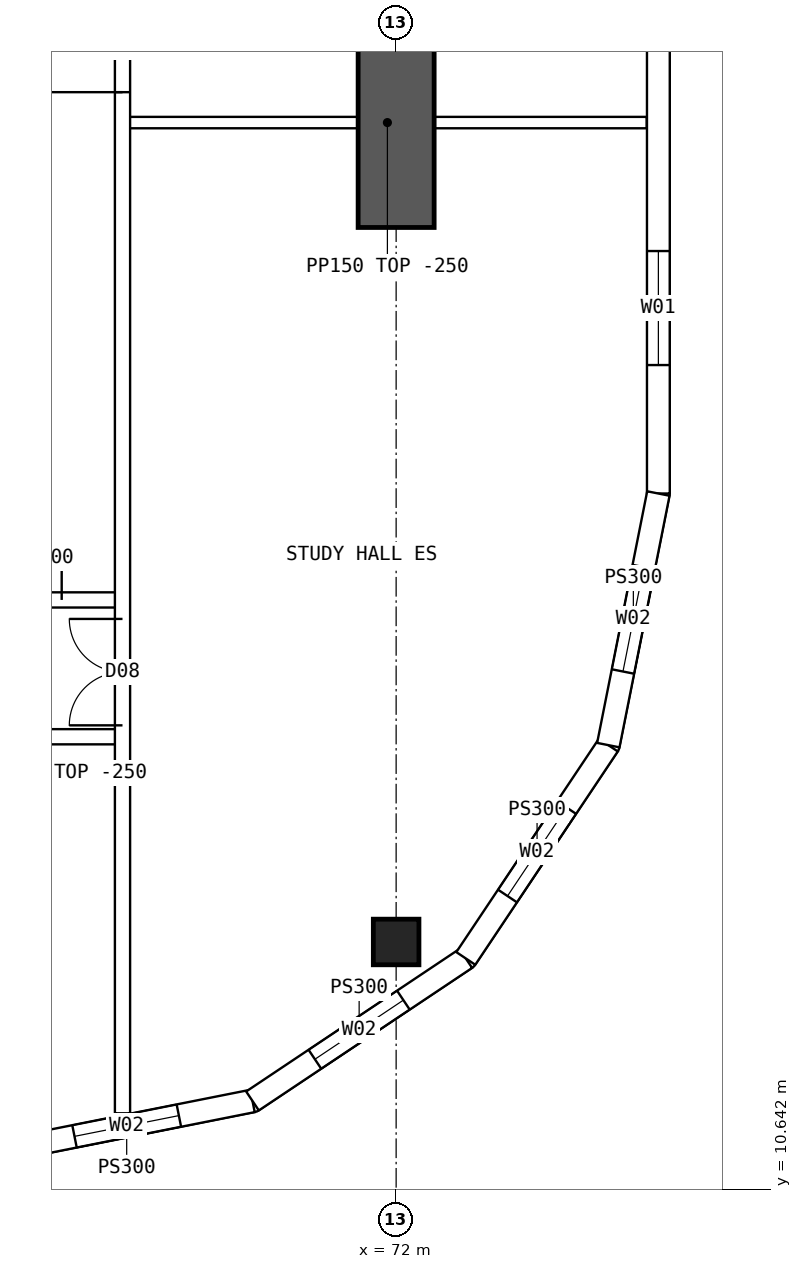
"""IFC4 building model, lengths in metres.
Left out: names, types, materials, properties, quantities, classifications, styles, units other than length and angle.
Written with IfcOpenShell. Run it as: python <this file> out.ifc"""

import sys

from ifc_helpers import new_model, si_unit, direction, frame, frame_2d, origin, origin_2d, place, context, subcontext, project, spatial, polyline, rectangle, hollow_rectangle, outline, extrude, element, fill, save


model = new_model("IFC4")
c1 = context("Model", 3, precision=1e-05, world=origin(), true_north=direction((0.0, 1.0)))
c2 = subcontext(c1, "Body", "Model", "MODEL_VIEW")
j1 = project(units=[si_unit("LENGTHUNIT", "METRE"), si_unit("PLANEANGLEUNIT", "RADIAN")], contexts=[c1])
p1 = place(None, origin())
s1 = spatial("IfcSite", under=j1, at=p1, CompositionType="ELEMENT")
p2 = place(p1, origin())
s2 = spatial("IfcBuilding", under=s1, at=p2, CompositionType="ELEMENT")
p3 = place(p2, frame((0.0, 0.0, 231.55)))
s3 = spatial("IfcBuildingStorey", under=s2, at=p3, CompositionType="ELEMENT", Elevation=231.55)
p4 = place(p3, frame((72.0, 13.9, 0.0), z_axis=(0.0, 0.0, 1.0), x_axis=(1.0, 0.0, 0.0)))
e1 = element("IfcColumn", 1, at=p4, inside=s3, PredefinedType="COLUMN", context=c2, shape_type="SweptSolid", body=[
    extrude(hollow_rectangle(XDim=0.6, YDim=0.6, WallThickness=0.06, at=origin_2d()), origin(), (0.0, 0.0, 1.0), 3.75),
])
p5 = place(p3, frame((72.0, 23.3, 0.0), z_axis=(0.0, 0.0, 1.0), x_axis=(0.0, 1.0, 0.0)))
e2 = element("IfcWall", 2, at=p5, inside=s3, PredefinedType="SHEAR", context=c2, shape_type="SweptSolid", body=[
    extrude(rectangle(XDim=5.0, YDim=1.0, at=frame_2d((2.5, 0.0))), origin(), (0.0, 0.0, 1.0), 3.75),
])
p6 = place(p3, frame((75.45, 19.8, 0.0), z_axis=(0.0, 0.0, 1.0), x_axis=(0.0, 1.0, 0.0)))
e3 = element("IfcWall", 3, at=p6, inside=s3, PredefinedType="SOLIDWALL", context=c2, shape_type="SweptSolid", body=[
    extrude(outline(polyline([(-0.015, -0.15), (24.415, -0.15), (24.385, 0.15), (0.015, 0.15), (-0.015, -0.15)])), origin(), (0.0, 0.0, 1.0), 3.5),
])
p7 = place(p6, frame((1.69, 0.0, 0.9)))
e4 = element("IfcOpeningElement", 4, at=p7, cuts=e3, PredefinedType="OPENING", context=c2, shape_type="SweptSolid", body=[
    extrude(rectangle(XDim=1.5, YDim=2.0, at=frame_2d((0.75, 1.0))), frame((0.0, 0.16, 0.0), z_axis=(0.0, -1.0, 0.0), x_axis=(1.0, 0.0, 0.0)), (0.0, 0.0, 1.0), 0.32),
])
p8 = place(p6, frame((6.57, 0.0, 0.9)))
e5 = element("IfcOpeningElement", 5, at=p8, cuts=e3, PredefinedType="OPENING", context=c2, shape_type="SweptSolid", body=[
    extrude(rectangle(XDim=1.5, YDim=2.0, at=frame_2d((0.75, 1.0))), frame((0.0, 0.16, 0.0), z_axis=(0.0, -1.0, 0.0), x_axis=(1.0, 0.0, 0.0)), (0.0, 0.0, 1.0), 0.32),
])
p9 = place(p6, frame((11.45, 0.0, 0.9)))
e6 = element("IfcOpeningElement", 6, at=p9, cuts=e3, PredefinedType="OPENING", context=c2, shape_type="SweptSolid", body=[
    extrude(rectangle(XDim=1.5, YDim=2.0, at=frame_2d((0.75, 1.0))), frame((0.0, 0.16, 0.0), z_axis=(0.0, -1.0, 0.0), x_axis=(1.0, 0.0, 0.0)), (0.0, 0.0, 1.0), 0.32),
])
p10 = place(p6, frame((16.33, 0.0, 0.9)))
e7 = element("IfcOpeningElement", 7, at=p10, cuts=e3, PredefinedType="OPENING", context=c2, shape_type="SweptSolid", body=[
    extrude(rectangle(XDim=1.5, YDim=2.0, at=frame_2d((0.75, 1.0))), frame((0.0, 0.16, 0.0), z_axis=(0.0, -1.0, 0.0), x_axis=(1.0, 0.0, 0.0)), (0.0, 0.0, 1.0), 0.32),
])
p11 = place(p6, frame((21.21, 0.0, 0.9)))
e8 = element("IfcOpeningElement", 8, at=p11, cuts=e3, PredefinedType="OPENING", context=c2, shape_type="SweptSolid", body=[
    extrude(rectangle(XDim=1.5, YDim=2.0, at=frame_2d((0.75, 1.0))), frame((0.0, 0.16, 0.0), z_axis=(0.0, -1.0, 0.0), x_axis=(1.0, 0.0, 0.0)), (0.0, 0.0, 1.0), 0.32),
])
p12 = place(p3, frame((66.8, 11.15, 0.0), z_axis=(0.0, 0.0, 1.0), x_axis=(0.98078325777, 0.195100490205, 0.0)))
e9 = element("IfcWall", 9, at=p12, inside=s3, PredefinedType="SOLIDWALL", context=c2, shape_type="SweptSolid", body=[
    extrude(outline(polyline([(-0.03, -0.15), (3.405, -0.15), (3.345, 0.15), (0.03, 0.15), (-0.03, -0.15)])), origin(), (0.0, 0.0, 1.0), 3.5),
])
p13 = place(p12, frame((0.988, 0.0, 0.9)))
e10 = element("IfcOpeningElement", 10, at=p13, cuts=e9, PredefinedType="OPENING", context=c2, shape_type="SweptSolid", body=[
    extrude(rectangle(XDim=1.4, YDim=1.8, at=frame_2d((0.7, 0.9))), frame((0.0, 0.16, 0.0), z_axis=(0.0, -1.0, 0.0), x_axis=(1.0, 0.0, 0.0)), (0.0, 0.0, 1.0), 0.32),
])
p14 = place(p3, frame((70.11, 11.808, 0.0), z_axis=(0.0, 0.0, 1.0), x_axis=(0.831460037396, 0.555584562613, 0.0)))
e11 = element("IfcWall", 11, at=p14, inside=s3, PredefinedType="SOLIDWALL", context=c2, shape_type="SweptSolid", body=[
    extrude(outline(polyline([(-0.03, -0.15), (3.405, -0.15), (3.345, 0.15), (0.03, 0.15), (-0.03, -0.15)])), origin(), (0.0, 0.0, 1.0), 3.5),
])
p15 = place(p14, frame((0.988, 0.0, 0.9)))
e12 = element("IfcOpeningElement", 12, at=p15, cuts=e11, PredefinedType="OPENING", context=c2, shape_type="SweptSolid", body=[
    extrude(rectangle(XDim=1.4, YDim=1.8, at=frame_2d((0.7, 0.9))), frame((0.0, 0.16, 0.0), z_axis=(0.0, -1.0, 0.0), x_axis=(1.0, 0.0, 0.0)), (0.0, 0.0, 1.0), 0.32),
])
p16 = place(p3, frame((72.917, 13.684, 0.0), z_axis=(0.0, 0.0, 1.0), x_axis=(0.555567969291, 0.831471124873, 0.0)))
e13 = element("IfcWall", 13, at=p16, inside=s3, PredefinedType="SOLIDWALL", context=c2, shape_type="SweptSolid", body=[
    extrude(outline(polyline([(-0.03, -0.15), (3.405, -0.15), (3.345, 0.15), (0.03, 0.15), (-0.03, -0.15)])), origin(), (0.0, 0.0, 1.0), 3.5),
])
p17 = place(p16, frame((0.988, 0.0, 0.9)))
e14 = element("IfcOpeningElement", 14, at=p17, cuts=e13, PredefinedType="OPENING", context=c2, shape_type="SweptSolid", body=[
    extrude(rectangle(XDim=1.4, YDim=1.8, at=frame_2d((0.7, 0.9))), frame((0.0, 0.16, 0.0), z_axis=(0.0, -1.0, 0.0), x_axis=(1.0, 0.0, 0.0)), (0.0, 0.0, 1.0), 0.32),
])
p18 = place(p3, frame((74.792, 16.49, 0.0), z_axis=(0.0, 0.0, 1.0), x_axis=(0.19508664885, 0.980786011034, 0.0)))
e15 = element("IfcWall", 15, at=p18, inside=s3, PredefinedType="SOLIDWALL", context=c2, shape_type="SweptSolid", body=[
    extrude(outline(polyline([(-0.03, -0.15), (3.39, -0.15), (3.36, 0.15), (0.03, 0.15), (-0.03, -0.15)])), origin(), (0.0, 0.0, 1.0), 3.5),
])
p19 = place(p18, frame((0.988, 0.0, 0.9)))
e16 = element("IfcOpeningElement", 16, at=p19, cuts=e15, PredefinedType="OPENING", context=c2, shape_type="SweptSolid", body=[
    extrude(rectangle(XDim=1.4, YDim=1.8, at=frame_2d((0.7, 0.9))), frame((0.0, 0.16, 0.0), z_axis=(0.0, -1.0, 0.0), x_axis=(1.0, 0.0, 0.0)), (0.0, 0.0, 1.0), 0.32),
])
p20 = place(p3, frame((66.35, 16.6, 0.0), z_axis=(0.0, 0.0, 1.0), x_axis=(1.0, 0.0, 0.0)))
e17 = element("IfcWall", 17, at=p20, inside=s3, PredefinedType="SOLIDWALL", context=c2, shape_type="SweptSolid", body=[
    extrude(rectangle(XDim=2.05, YDim=0.2, at=frame_2d((1.025, 0.0))), origin(), (0.0, 0.0, 1.0), 3.5),
])
p21 = place(p20, frame((0.2, 0.0, 0.0)))
e18 = element("IfcOpeningElement", 18, at=p21, cuts=e17, PredefinedType="OPENING", context=c2, shape_type="SweptSolid", body=[
    extrude(rectangle(XDim=0.9, YDim=2.1, at=frame_2d((0.45, 1.05))), frame((0.0, 0.11, 0.0), z_axis=(0.0, -1.0, 0.0), x_axis=(1.0, 0.0, 0.0)), (0.0, 0.0, 1.0), 0.22),
])
p22 = place(p3, frame((66.35, 18.4, 0.0), z_axis=(0.0, 0.0, 1.0), x_axis=(1.0, 0.0, 0.0)))
e19 = element("IfcWall", 19, at=p22, inside=s3, PredefinedType="SOLIDWALL", context=c2, shape_type="SweptSolid", body=[
    extrude(rectangle(XDim=2.05, YDim=0.2, at=frame_2d((1.025, 0.0))), origin(), (0.0, 0.0, 1.0), 3.5),
])
p23 = place(p22, frame((0.05, 0.0, 0.0)))
e20 = element("IfcOpeningElement", 20, at=p23, cuts=e19, PredefinedType="OPENING", context=c2, shape_type="SweptSolid", body=[
    extrude(rectangle(XDim=1.2, YDim=2.1, at=frame_2d((0.6, 1.05))), frame((0.0, 0.11, 0.0), z_axis=(0.0, -1.0, 0.0), x_axis=(1.0, 0.0, 0.0)), (0.0, 0.0, 1.0), 0.22),
])
p24 = place(p3, frame((68.4, 11.646, 0.0), z_axis=(0.0, 0.0, 1.0), x_axis=(0.0, 1.0, 0.0)))
e21 = element("IfcWall", 21, at=p24, inside=s3, PredefinedType="SOLIDWALL", context=c2, shape_type="SweptSolid", body=[
    extrude(rectangle(XDim=40.708, YDim=0.2, at=frame_2d((20.354, 0.0))), origin(), (0.0, 0.0, 1.0), 3.5),
])
p25 = place(p24, frame((13.434, 0.0, 0.0)))
e22 = element("IfcOpeningElement", 22, at=p25, cuts=e21, PredefinedType="OPENING", context=c2, shape_type="SweptSolid", body=[
    extrude(rectangle(XDim=1.2, YDim=2.1, at=frame_2d((0.6, 1.05))), frame((0.0, 0.11, 0.0), z_axis=(0.0, -1.0, 0.0), x_axis=(1.0, 0.0, 0.0)), (0.0, 0.0, 1.0), 0.22),
])
p26 = place(p24, frame((21.194, 0.0, 0.0)))
e23 = element("IfcOpeningElement", 23, at=p26, cuts=e21, PredefinedType="OPENING", context=c2, shape_type="SweptSolid", body=[
    extrude(rectangle(XDim=1.2, YDim=2.1, at=frame_2d((0.6, 1.05))), frame((0.0, 0.11, 0.0), z_axis=(0.0, -1.0, 0.0), x_axis=(1.0, 0.0, 0.0)), (0.0, 0.0, 1.0), 0.22),
])
p27 = place(p24, frame((5.104, 0.0, 0.0)))
e24 = element("IfcOpeningElement", 24, at=p27, cuts=e21, PredefinedType="OPENING", context=c2, shape_type="SweptSolid", body=[
    extrude(rectangle(XDim=1.4, YDim=2.1, at=frame_2d((0.7, 1.05))), frame((0.0, 0.11, 0.0), z_axis=(0.0, -1.0, 0.0), x_axis=(1.0, 0.0, 0.0)), (0.0, 0.0, 1.0), 0.22),
])
p28 = place(p24, frame((34.104, 0.0, 0.0)))
e25 = element("IfcOpeningElement", 25, at=p28, cuts=e21, PredefinedType="OPENING", context=c2, shape_type="SweptSolid", body=[
    extrude(rectangle(XDim=1.4, YDim=2.1, at=frame_2d((0.7, 1.05))), frame((0.0, 0.11, 0.0), z_axis=(0.0, -1.0, 0.0), x_axis=(1.0, 0.0, 0.0)), (0.0, 0.0, 1.0), 0.22),
])
p29 = place(p3, frame((68.475, 24.68, 0.0), z_axis=(0.0, 0.0, 1.0), x_axis=(1.0, 0.0, 0.0)))
e26 = element("IfcWall", 26, at=p29, inside=s3, PredefinedType="PARTITIONING", context=c2, shape_type="SweptSolid", body=[
    extrude(rectangle(XDim=6.82, YDim=0.15, at=frame_2d((3.41, 0.0))), origin(), (0.0, 0.0, 1.0), 3.5),
])
p30 = place(p7, origin())
e27 = element("IfcWindow", 27, at=p30, inside=s3, PartitioningType="SINGLE_PANEL", PredefinedType="WINDOW", context=c2, shape_type="SweptSolid", body=[
    extrude(rectangle(XDim=1.5, YDim=2.0, at=frame_2d((0.75, 1.0))), frame((0.0, 0.03, 0.0), z_axis=(0.0, -1.0, 0.0), x_axis=(1.0, 0.0, 0.0)), (0.0, 0.0, 1.0), 0.06),
])
fill(e4, e27)
p31 = place(p13, origin())
e28 = element("IfcWindow", 28, at=p31, inside=s3, PartitioningType="SINGLE_PANEL", PredefinedType="WINDOW", context=c2, shape_type="SweptSolid", body=[
    extrude(rectangle(XDim=1.4, YDim=1.8, at=frame_2d((0.7, 0.9))), frame((0.0, 0.03, 0.0), z_axis=(0.0, -1.0, 0.0), x_axis=(1.0, 0.0, 0.0)), (0.0, 0.0, 1.0), 0.06),
])
fill(e10, e28)
p32 = place(p15, origin())
e29 = element("IfcWindow", 29, at=p32, inside=s3, PartitioningType="SINGLE_PANEL", PredefinedType="WINDOW", context=c2, shape_type="SweptSolid", body=[
    extrude(rectangle(XDim=1.4, YDim=1.8, at=frame_2d((0.7, 0.9))), frame((0.0, 0.03, 0.0), z_axis=(0.0, -1.0, 0.0), x_axis=(1.0, 0.0, 0.0)), (0.0, 0.0, 1.0), 0.06),
])
fill(e12, e29)
p33 = place(p17, origin())
e30 = element("IfcWindow", 30, at=p33, inside=s3, PartitioningType="SINGLE_PANEL", PredefinedType="WINDOW", context=c2, shape_type="SweptSolid", body=[
    extrude(rectangle(XDim=1.4, YDim=1.8, at=frame_2d((0.7, 0.9))), frame((0.0, 0.03, 0.0), z_axis=(0.0, -1.0, 0.0), x_axis=(1.0, 0.0, 0.0)), (0.0, 0.0, 1.0), 0.06),
])
fill(e14, e30)
p34 = place(p19, origin())
e31 = element("IfcWindow", 31, at=p34, inside=s3, PartitioningType="SINGLE_PANEL", PredefinedType="WINDOW", context=c2, shape_type="SweptSolid", body=[
    extrude(rectangle(XDim=1.4, YDim=1.8, at=frame_2d((0.7, 0.9))), frame((0.0, 0.03, 0.0), z_axis=(0.0, -1.0, 0.0), x_axis=(1.0, 0.0, 0.0)), (0.0, 0.0, 1.0), 0.06),
])
fill(e16, e31)
p35 = place(p23, origin())
e32 = element("IfcDoor", 32, at=p35, inside=s3, OperationType="DOUBLE_DOOR_SINGLE_SWING", PredefinedType="DOOR", context=c2, shape_type="SweptSolid", body=[
    extrude(rectangle(XDim=1.2, YDim=2.1, at=frame_2d((0.6, 1.05))), frame((0.0, 0.025, 0.0), z_axis=(0.0, -1.0, 0.0), x_axis=(1.0, 0.0, 0.0)), (0.0, 0.0, 1.0), 0.05),
])
fill(e20, e32)
p36 = place(p25, origin())
e33 = element("IfcDoor", 33, at=p36, inside=s3, OperationType="SINGLE_SWING_LEFT", PredefinedType="DOOR", context=c2, shape_type="SweptSolid", body=[
    extrude(rectangle(XDim=1.2, YDim=2.1, at=frame_2d((0.6, 1.05))), frame((0.0, 0.025, 0.0), z_axis=(0.0, -1.0, 0.0), x_axis=(1.0, 0.0, 0.0)), (0.0, 0.0, 1.0), 0.05),
])
fill(e22, e33)
p37 = place(p27, origin())
e34 = element("IfcDoor", 34, at=p37, inside=s3, OperationType="DOUBLE_DOOR_SINGLE_SWING", PredefinedType="DOOR", context=c2, shape_type="SweptSolid", body=[
    extrude(rectangle(XDim=1.4, YDim=2.1, at=frame_2d((0.7, 1.05))), frame((0.0, 0.025, 0.0), z_axis=(0.0, -1.0, 0.0), x_axis=(1.0, 0.0, 0.0)), (0.0, 0.0, 1.0), 0.05),
])
fill(e24, e34)
save(model, sys.argv[1])
